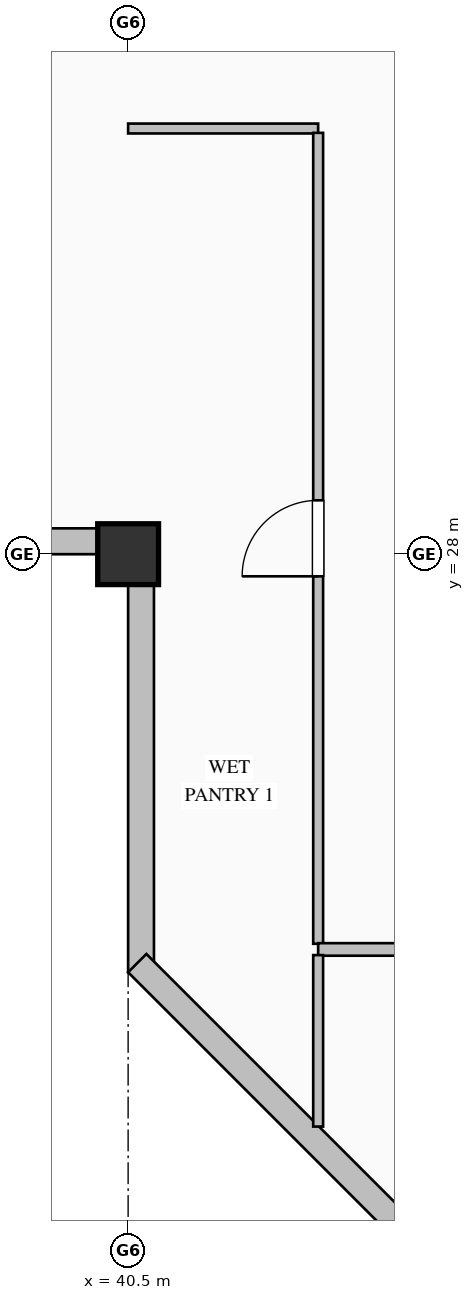
"""IFC4 building model, lengths in metres.
Left out: names, types, materials, properties, quantities, classifications, styles, units other than length and angle.
Written with IfcOpenShell. Run it as: python <this file> out.ifc"""

import sys

from ifc_helpers import new_model, si_unit, direction, frame, frame_2d, origin, origin_2d, place, context, subcontext, project, spatial, rectangle, hollow_rectangle, extrude, element, fill, save


model = new_model("IFC4")
c1 = context("Model", 3, precision=1e-05, world=origin(), true_north=direction((0.0, 1.0)))
c2 = subcontext(c1, "Body", "Model", "MODEL_VIEW")
j1 = project(units=[si_unit("LENGTHUNIT", "METRE"), si_unit("PLANEANGLEUNIT", "RADIAN")], contexts=[c1])
p1 = place(None, origin())
s1 = spatial("IfcSite", under=j1, at=p1, CompositionType="ELEMENT")
p2 = place(p1, origin())
s2 = spatial("IfcBuilding", under=s1, at=p2, CompositionType="ELEMENT")
p3 = place(p2, frame((0.0, 0.0, 351.2)))
s3 = spatial("IfcBuildingStorey", under=s2, at=p3, CompositionType="ELEMENT", Elevation=351.2)
p4 = place(p3, frame((40.5, 28.0, 0.0), z_axis=(0.0, 0.0, 1.0), x_axis=(1.0, 0.0, 0.0)))
e1 = element("IfcColumn", 1, at=p4, inside=s3, PredefinedType="COLUMN", context=c2, shape_type="SweptSolid", body=[
    extrude(hollow_rectangle(XDim=0.8, YDim=0.8, WallThickness=0.032, at=origin_2d()), origin(), (0.0, 0.0, 1.0), 4.0),
])
p5 = place(p3, frame((40.67, 22.5, 0.0), z_axis=(0.0, 0.0, 1.0), x_axis=(0.0, 1.0, 0.0)))
e2 = element("IfcWall", 2, at=p5, inside=s3, PredefinedType="SOLIDWALL", context=c2, shape_type="SweptSolid", body=[
    extrude(rectangle(XDim=5.84, YDim=0.34, at=frame_2d((2.92, 0.0))), origin(), (0.0, 0.0, 1.0), 3.185),
])
p6 = place(p3, frame((40.52, 28.17, 0.0), z_axis=(0.0, 0.0, 1.0), x_axis=(-1.0, 0.0, 0.0)))
e3 = element("IfcWall", 3, at=p6, inside=s3, PredefinedType="SOLIDWALL", context=c2, shape_type="SweptSolid", body=[
    extrude(rectangle(XDim=20.02, YDim=0.34, at=frame_2d((10.01, 0.0))), origin(), (0.0, 0.0, 1.0), 3.185),
])
p7 = place(p6, frame((2.925, 0.0, 0.9)))
e4 = element("IfcOpeningElement", 4, at=p7, cuts=e3, PredefinedType="OPENING", context=c2, shape_type="SweptSolid", body=[
    extrude(rectangle(XDim=1.35, YDim=1.85, at=frame_2d((0.675, 0.925))), frame((0.0, 0.18, 0.0), z_axis=(0.0, -1.0, 0.0), x_axis=(1.0, 0.0, 0.0)), (0.0, 0.0, 1.0), 0.36),
])
p8 = place(p6, frame((13.725, 0.0, 0.9)))
e5 = element("IfcOpeningElement", 5, at=p8, cuts=e3, PredefinedType="OPENING", context=c2, shape_type="SweptSolid", body=[
    extrude(rectangle(XDim=1.35, YDim=1.85, at=frame_2d((0.675, 0.925))), frame((0.0, 0.18, 0.0), z_axis=(0.0, -1.0, 0.0), x_axis=(1.0, 0.0, 0.0)), (0.0, 0.0, 1.0), 0.36),
])
p9 = place(p3, frame((44.62, 18.62, 0.0), z_axis=(0.0, 0.0, 1.0), x_axis=(-0.707106781187, 0.707106781187, 0.0)))
e6 = element("IfcWall", 6, at=p9, inside=s3, PredefinedType="SOLIDWALL", context=c2, shape_type="SweptSolid", body=[
    extrude(rectangle(XDim=5.657, YDim=0.34, at=frame_2d((2.828, 0.0))), origin(), (0.0, 0.0, 1.0), 3.785),
])
p10 = place(p3, frame((43.0, 33.6, 0.0), z_axis=(0.0, 0.0, 1.0), x_axis=(-1.0, 0.0, 0.0)))
e7 = element("IfcWall", 7, at=p10, inside=s3, PredefinedType="PARTITIONING", context=c2, shape_type="SweptSolid", body=[
    extrude(rectangle(XDim=2.5, YDim=0.13, at=frame_2d((1.25, 0.0))), origin(), (0.0, 0.0, 1.0), 3.785),
])
p11 = place(p3, frame((43.0, 22.875, 0.0), z_axis=(0.0, 0.0, 1.0), x_axis=(0.0, 1.0, 0.0)))
e8 = element("IfcWall", 8, at=p11, inside=s3, PredefinedType="PARTITIONING", context=c2, shape_type="SweptSolid", body=[
    extrude(rectangle(XDim=10.668, YDim=0.13, at=frame_2d((5.334, 0.0))), origin(), (0.0, 0.0, 1.0), 3.785),
])
p12 = place(p11, frame((4.834, 0.0, 0.0)))
e9 = element("IfcOpeningElement", 9, at=p12, cuts=e8, PredefinedType="OPENING", context=c2, shape_type="SweptSolid", body=[
    extrude(rectangle(XDim=1.0, YDim=2.15, at=frame_2d((0.5, 1.075))), frame((0.0, 0.075, 0.0), z_axis=(0.0, -1.0, 0.0), x_axis=(1.0, 0.0, 0.0)), (0.0, 0.0, 1.0), 0.15),
])
p13 = place(p3, frame((45.2, 22.8, 0.0), z_axis=(0.0, 0.0, 1.0), x_axis=(-1.0, 0.0, 0.0)))
e10 = element("IfcWall", 10, at=p13, inside=s3, PredefinedType="PARTITIONING", context=c2, shape_type="SweptSolid", body=[
    extrude(rectangle(XDim=2.2, YDim=0.165, at=frame_2d((1.1, 0.0))), origin(), (0.0, 0.0, 1.0), 3.785),
])
p14 = place(p3, frame((43.0, 22.726, 0.0), z_axis=(0.0, 0.0, 1.0), x_axis=(0.0, -1.0, 0.0)))
e11 = element("IfcWall", 11, at=p14, inside=s3, PredefinedType="PARTITIONING", context=c2, shape_type="SweptSolid", body=[
    extrude(rectangle(XDim=2.256, YDim=0.13, at=frame_2d((1.128, 0.0))), origin(), (0.0, 0.0, 1.0), 3.785),
])
p15 = place(p12, origin())
e12 = element("IfcDoor", 12, at=p15, inside=s3, OperationType="SINGLE_SWING_LEFT", PredefinedType="DOOR", context=c2, shape_type="SweptSolid", body=[
    extrude(rectangle(XDim=1.0, YDim=2.15, at=frame_2d((0.5, 1.075))), frame((0.0, 0.025, 0.0), z_axis=(0.0, -1.0, 0.0), x_axis=(1.0, 0.0, 0.0)), (0.0, 0.0, 1.0), 0.05),
])
fill(e9, e12)
save(model, sys.argv[1])
